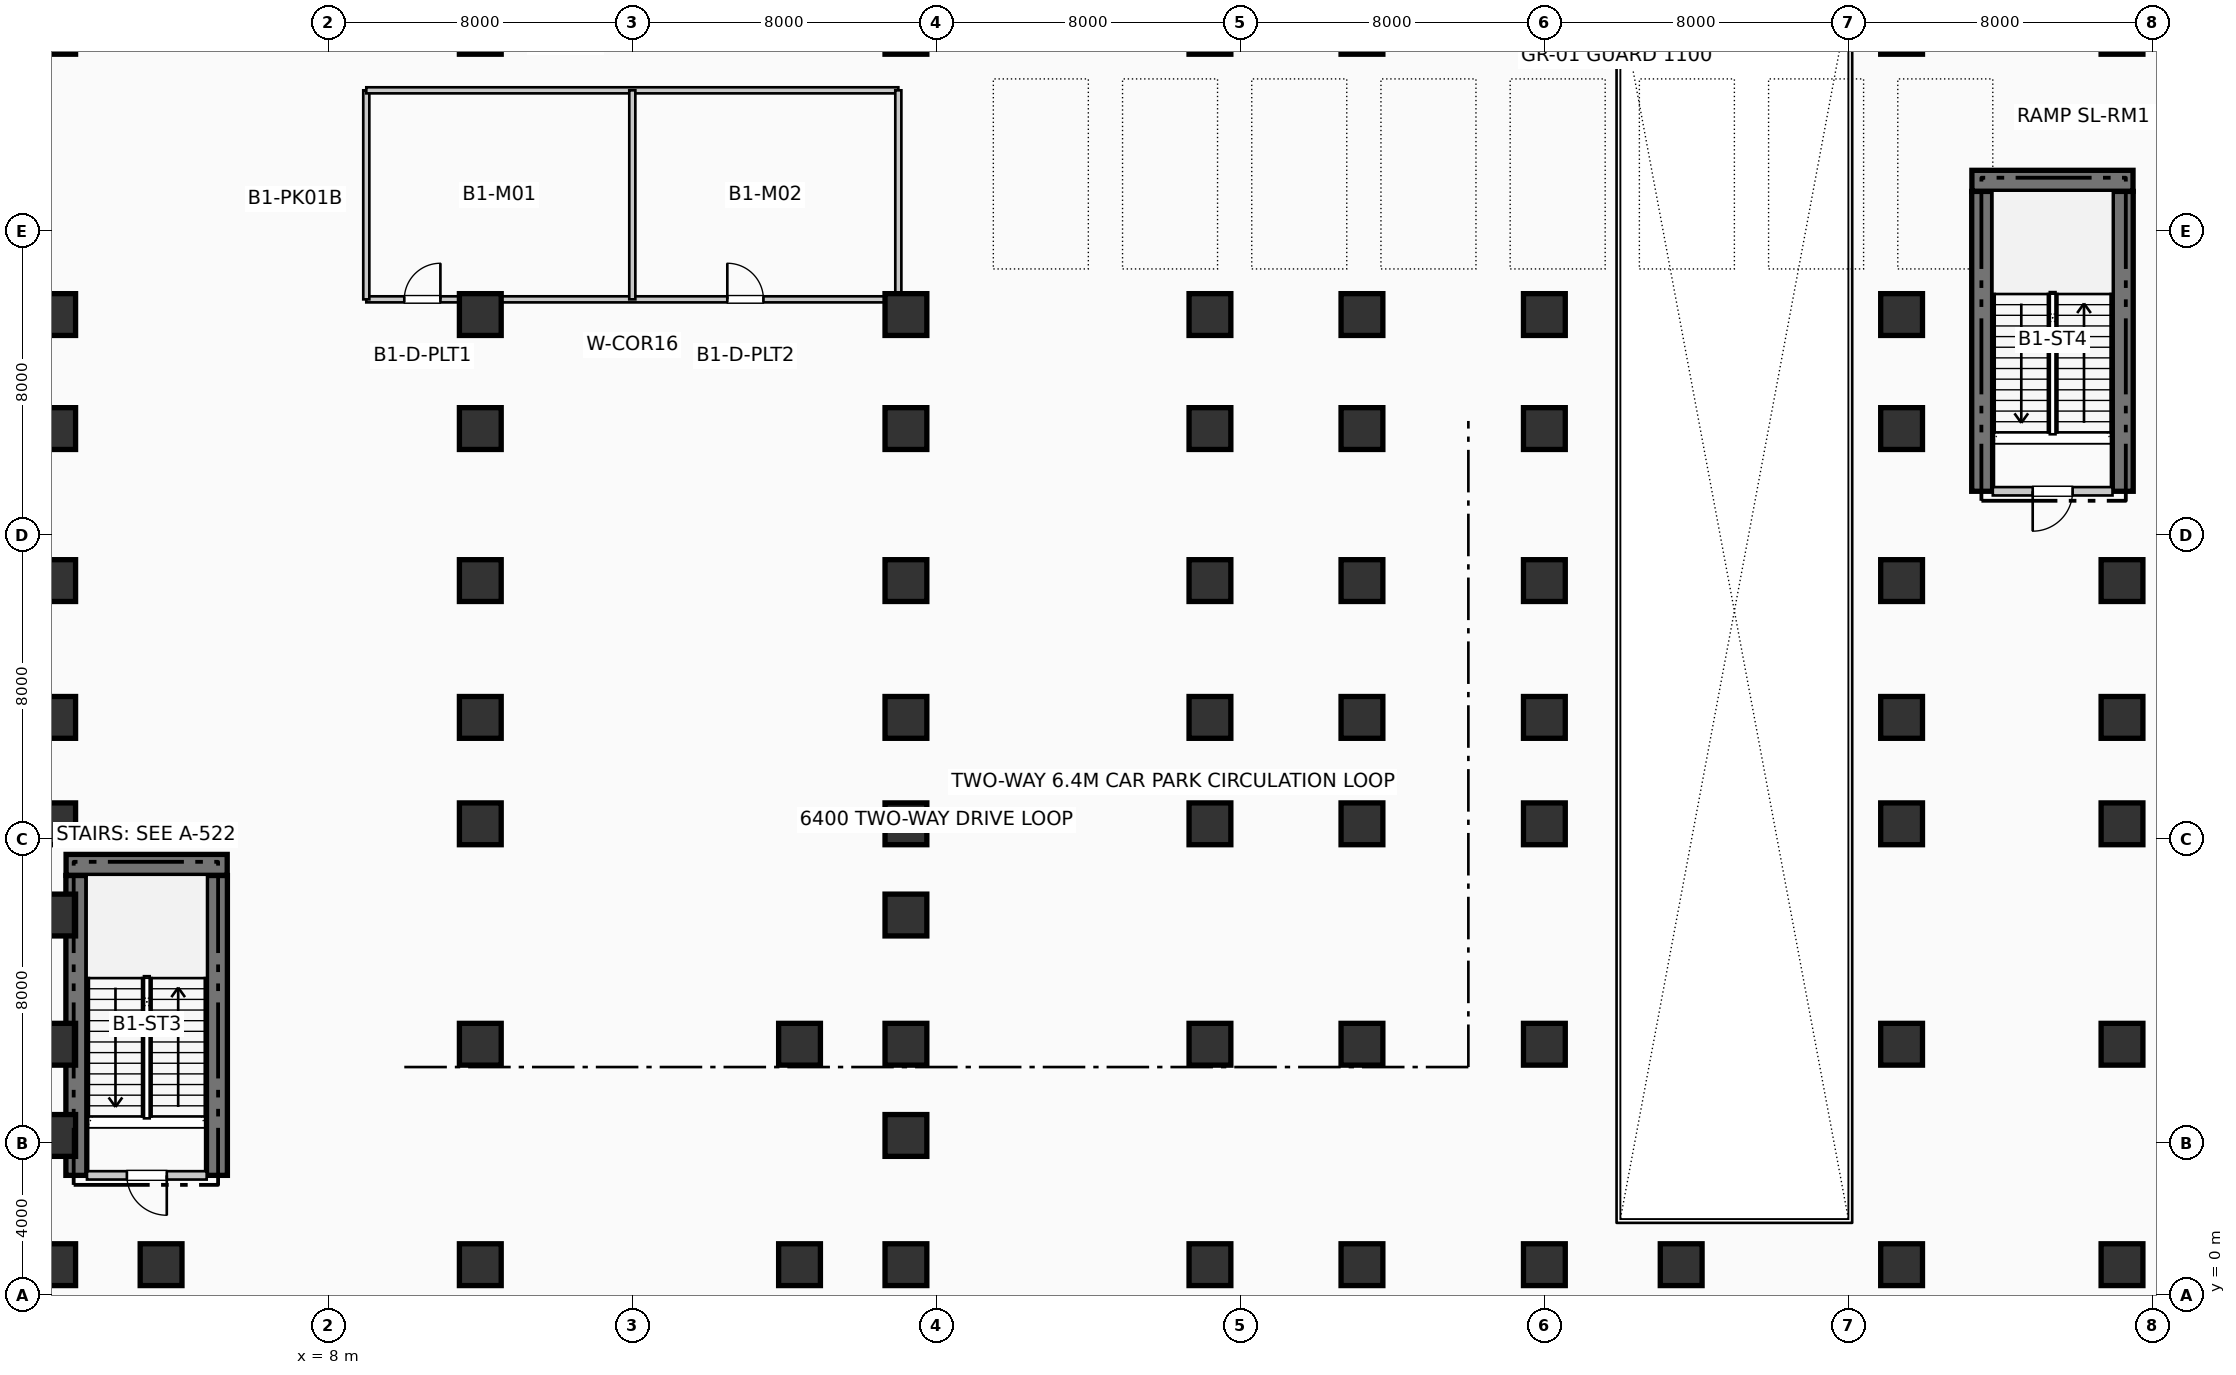
"""IFC4 building model, lengths in metres.
Left out: names, types, materials, properties, quantities, classifications, styles, units other than length and angle.
Written with IfcOpenShell. Run it as: python <this file> out.ifc"""

import sys

from ifc_helpers import new_model, si_unit, direction, frame, frame_2d, origin, origin_2d, place, context, subcontext, project, spatial, rectangle, extrude, element, fill, save


model = new_model("IFC4")
c1 = context("Model", 3, precision=1e-05, world=origin(), true_north=direction((0.0, 1.0)))
c2 = subcontext(c1, "Body", "Model", "MODEL_VIEW")
j1 = project(units=[si_unit("LENGTHUNIT", "METRE"), si_unit("PLANEANGLEUNIT", "RADIAN")], contexts=[c1])
p1 = place(None, origin())
s1 = spatial("IfcSite", under=j1, at=p1, CompositionType="ELEMENT")
p2 = place(p1, origin())
s2 = spatial("IfcBuilding", under=s1, at=p2, CompositionType="ELEMENT")
p3 = place(p2, frame((0.0, 0.0, -4.62)))
s3 = spatial("IfcBuildingStorey", under=s2, at=p3, CompositionType="ELEMENT", Elevation=-4.62)
for number, where, z_axis, x_axis in (
    (1, (1.37, 3.15, 0.0), (0.0, 0.0, 1.0), (0.0, 1.0, 0.0)),
    (2, (5.07, 3.15, 0.0), (0.0, 0.0, 1.0), (0.0, 1.0, 0.0)),
):
    element("IfcWall", number, at=place(p3, frame(where, z_axis=z_axis, x_axis=x_axis)), inside=s3, PredefinedType="SHEAR", context=c2, shape_type="SweptSolid", body=[
        extrude(rectangle(XDim=7.89, YDim=0.55, at=frame_2d((3.945, 0.0))), origin(), (0.0, 0.0, 1.0), 4.62),
    ])
p4 = place(p3, frame((1.1, 11.32, 0.0), z_axis=(0.0, 0.0, 1.0), x_axis=(1.0, 0.0, 0.0)))
e3 = element("IfcWall", 3, at=p4, inside=s3, PredefinedType="SHEAR", context=c2, shape_type="SweptSolid", body=[
    extrude(rectangle(XDim=4.24, YDim=0.55, at=frame_2d((2.12, 0.0))), origin(), (0.0, 0.0, 1.0), 4.62),
])
for number, where, z_axis, x_axis in (
    (4, (51.52, 21.15, 0.0), (0.0, 0.0, 1.0), (0.0, 1.0, 0.0)),
    (5, (55.22, 21.15, 0.0), (0.0, 0.0, 1.0), (0.0, 1.0, 0.0)),
):
    element("IfcWall", number, at=place(p3, frame(where, z_axis=z_axis, x_axis=x_axis)), inside=s3, PredefinedType="SHEAR", context=c2, shape_type="SweptSolid", body=[
        extrude(rectangle(XDim=7.89, YDim=0.55, at=frame_2d((3.945, 0.0))), origin(), (0.0, 0.0, 1.0), 4.62),
    ])
p5 = place(p3, frame((51.25, 29.32, 0.0), z_axis=(0.0, 0.0, 1.0), x_axis=(1.0, 0.0, 0.0)))
e6 = element("IfcWall", 6, at=p5, inside=s3, PredefinedType="SHEAR", context=c2, shape_type="SweptSolid", body=[
    extrude(rectangle(XDim=4.24, YDim=0.55, at=frame_2d((2.12, 0.0))), origin(), (0.0, 0.0, 1.0), 4.62),
])
for number, where, z_axis, x_axis in (
    (7, (0.8, 0.8, 0.0), (0.0, 0.0, 1.0), (1.0, 0.0, 0.0)),
    (8, (0.8, 4.2, 0.0), (0.0, 0.0, 1.0), (1.0, 0.0, 0.0)),
    (9, (0.8, 6.6, 0.0), (0.0, 0.0, 1.0), (1.0, 0.0, 0.0)),
    (10, (0.8, 10.0, 0.0), (0.0, 0.0, 1.0), (1.0, 0.0, 0.0)),
    (11, (0.8, 12.4, 0.0), (0.0, 0.0, 1.0), (1.0, 0.0, 0.0)),
    (12, (0.8, 15.2, 0.0), (0.0, 0.0, 1.0), (1.0, 0.0, 0.0)),
    (13, (0.8, 18.8, 0.0), (0.0, 0.0, 1.0), (1.0, 0.0, 0.0)),
    (14, (0.8, 22.8, 0.0), (0.0, 0.0, 1.0), (1.0, 0.0, 0.0)),
    (15, (0.8, 25.8, 0.0), (0.0, 0.0, 1.0), (1.0, 0.0, 0.0)),
    (16, (0.8, 33.2, 0.0), (0.0, 0.0, 1.0), (1.0, 0.0, 0.0)),
    (17, (3.6, 0.8, 0.0), (0.0, 0.0, 1.0), (1.0, 0.0, 0.0)),
    (18, (12.0, 0.8, 0.0), (0.0, 0.0, 1.0), (1.0, 0.0, 0.0)),
    (19, (12.0, 6.6, 0.0), (0.0, 0.0, 1.0), (1.0, 0.0, 0.0)),
    (20, (12.0, 12.4, 0.0), (0.0, 0.0, 1.0), (1.0, 0.0, 0.0)),
    (21, (12.0, 15.2, 0.0), (0.0, 0.0, 1.0), (1.0, 0.0, 0.0)),
    (22, (12.0, 18.8, 0.0), (0.0, 0.0, 1.0), (1.0, 0.0, 0.0)),
    (23, (12.0, 22.8, 0.0), (0.0, 0.0, 1.0), (1.0, 0.0, 0.0)),
    (24, (12.0, 25.8, 0.0), (0.0, 0.0, 1.0), (1.0, 0.0, 0.0)),
    (25, (12.0, 33.2, 0.0), (0.0, 0.0, 1.0), (1.0, 0.0, 0.0)),
    (26, (20.4, 0.8, 0.0), (0.0, 0.0, 1.0), (1.0, 0.0, 0.0)),
    (27, (20.4, 6.6, 0.0), (0.0, 0.0, 1.0), (1.0, 0.0, 0.0)),
    (28, (23.2, 0.8, 0.0), (0.0, 0.0, 1.0), (1.0, 0.0, 0.0)),
    (29, (23.2, 4.2, 0.0), (0.0, 0.0, 1.0), (1.0, 0.0, 0.0)),
    (30, (23.2, 6.6, 0.0), (0.0, 0.0, 1.0), (1.0, 0.0, 0.0)),
    (31, (23.2, 10.0, 0.0), (0.0, 0.0, 1.0), (1.0, 0.0, 0.0)),
    (32, (23.2, 12.4, 0.0), (0.0, 0.0, 1.0), (1.0, 0.0, 0.0)),
    (33, (23.2, 15.2, 0.0), (0.0, 0.0, 1.0), (1.0, 0.0, 0.0)),
    (34, (23.2, 18.8, 0.0), (0.0, 0.0, 1.0), (1.0, 0.0, 0.0)),
    (35, (23.2, 22.8, 0.0), (0.0, 0.0, 1.0), (1.0, 0.0, 0.0)),
    (36, (23.2, 25.8, 0.0), (0.0, 0.0, 1.0), (1.0, 0.0, 0.0)),
    (37, (23.2, 33.2, 0.0), (0.0, 0.0, 1.0), (1.0, 0.0, 0.0)),
    (38, (31.2, 0.8, 0.0), (0.0, 0.0, 1.0), (1.0, 0.0, 0.0)),
    (39, (31.2, 6.6, 0.0), (0.0, 0.0, 1.0), (1.0, 0.0, 0.0)),
    (40, (31.2, 12.4, 0.0), (0.0, 0.0, 1.0), (1.0, 0.0, 0.0)),
    (41, (31.2, 15.2, 0.0), (0.0, 0.0, 1.0), (1.0, 0.0, 0.0)),
    (42, (31.2, 18.8, 0.0), (0.0, 0.0, 1.0), (1.0, 0.0, 0.0)),
    (43, (31.2, 22.8, 0.0), (0.0, 0.0, 1.0), (1.0, 0.0, 0.0)),
    (44, (31.2, 25.8, 0.0), (0.0, 0.0, 1.0), (1.0, 0.0, 0.0)),
    (45, (31.2, 33.2, 0.0), (0.0, 0.0, 1.0), (1.0, 0.0, 0.0)),
    (46, (35.2, 0.8, 0.0), (0.0, 0.0, 1.0), (1.0, 0.0, 0.0)),
    (47, (35.2, 6.6, 0.0), (0.0, 0.0, 1.0), (1.0, 0.0, 0.0)),
    (48, (35.2, 12.4, 0.0), (0.0, 0.0, 1.0), (1.0, 0.0, 0.0)),
    (49, (35.2, 15.2, 0.0), (0.0, 0.0, 1.0), (1.0, 0.0, 0.0)),
    (50, (35.2, 18.8, 0.0), (0.0, 0.0, 1.0), (1.0, 0.0, 0.0)),
    (51, (35.2, 22.8, 0.0), (0.0, 0.0, 1.0), (1.0, 0.0, 0.0)),
    (52, (35.2, 25.8, 0.0), (0.0, 0.0, 1.0), (1.0, 0.0, 0.0)),
    (53, (35.2, 33.2, 0.0), (0.0, 0.0, 1.0), (1.0, 0.0, 0.0)),
    (54, (40.0, 0.8, 0.0), (0.0, 0.0, 1.0), (1.0, 0.0, 0.0)),
    (55, (40.0, 6.6, 0.0), (0.0, 0.0, 1.0), (1.0, 0.0, 0.0)),
    (56, (40.0, 12.4, 0.0), (0.0, 0.0, 1.0), (1.0, 0.0, 0.0)),
    (57, (40.0, 15.2, 0.0), (0.0, 0.0, 1.0), (1.0, 0.0, 0.0)),
    (58, (40.0, 18.8, 0.0), (0.0, 0.0, 1.0), (1.0, 0.0, 0.0)),
    (59, (40.0, 22.8, 0.0), (0.0, 0.0, 1.0), (1.0, 0.0, 0.0)),
    (60, (40.0, 25.8, 0.0), (0.0, 0.0, 1.0), (1.0, 0.0, 0.0)),
    (61, (40.0, 33.2, 0.0), (0.0, 0.0, 1.0), (1.0, 0.0, 0.0)),
    (62, (43.6, 0.8, 0.0), (0.0, 0.0, 1.0), (1.0, 0.0, 0.0)),
    (63, (49.4, 0.8, 0.0), (0.0, 0.0, 1.0), (1.0, 0.0, 0.0)),
    (64, (49.4, 6.6, 0.0), (0.0, 0.0, 1.0), (1.0, 0.0, 0.0)),
    (65, (49.4, 12.4, 0.0), (0.0, 0.0, 1.0), (1.0, 0.0, 0.0)),
    (66, (49.4, 15.2, 0.0), (0.0, 0.0, 1.0), (1.0, 0.0, 0.0)),
    (67, (49.4, 18.8, 0.0), (0.0, 0.0, 1.0), (1.0, 0.0, 0.0)),
    (68, (49.4, 22.8, 0.0), (0.0, 0.0, 1.0), (1.0, 0.0, 0.0)),
    (69, (49.4, 25.8, 0.0), (0.0, 0.0, 1.0), (1.0, 0.0, 0.0)),
    (70, (49.4, 33.2, 0.0), (0.0, 0.0, 1.0), (1.0, 0.0, 0.0)),
    (71, (55.2, 0.8, 0.0), (0.0, 0.0, 1.0), (1.0, 0.0, 0.0)),
    (72, (55.2, 6.6, 0.0), (0.0, 0.0, 1.0), (1.0, 0.0, 0.0)),
    (73, (55.2, 12.4, 0.0), (0.0, 0.0, 1.0), (1.0, 0.0, 0.0)),
    (74, (55.2, 15.2, 0.0), (0.0, 0.0, 1.0), (1.0, 0.0, 0.0)),
    (75, (55.2, 18.8, 0.0), (0.0, 0.0, 1.0), (1.0, 0.0, 0.0)),
    (76, (55.2, 33.2, 0.0), (0.0, 0.0, 1.0), (1.0, 0.0, 0.0)),
):
    element("IfcColumn", number, at=place(p3, frame(where, z_axis=z_axis, x_axis=x_axis)), inside=s3, PredefinedType="COLUMN", context=c2, shape_type="SweptSolid", body=[
        extrude(rectangle(XDim=1.1, YDim=1.1, at=origin_2d()), origin(), (0.0, 0.0, 1.0), 4.62),
    ])
p6 = place(p3, frame((1.65, 3.15, 0.0), z_axis=(0.0, 0.0, 1.0), x_axis=(1.0, 0.0, 0.0)))
e77 = element("IfcWall", 77, at=p6, inside=s3, PredefinedType="PARTITIONING", context=c2, shape_type="SweptSolid", body=[
    extrude(rectangle(XDim=3.15, YDim=0.22, at=frame_2d((1.575, 0.0))), origin(), (0.0, 0.0, 1.0), 4.3),
])
p7 = place(p6, frame((2.1, 0.0, 0.0), z_axis=(0.0, 0.0, 1.0), x_axis=(-1.0, 0.0, 0.0)))
e78 = element("IfcOpeningElement", 78, at=p7, cuts=e77, PredefinedType="OPENING", context=c2, shape_type="SweptSolid", body=[
    extrude(rectangle(XDim=1.05, YDim=2.15, at=frame_2d((0.525, 1.075))), frame((0.0, 0.12, 0.0), z_axis=(0.0, -1.0, 0.0), x_axis=(1.0, 0.0, 0.0)), (0.0, 0.0, 1.0), 0.24),
])
p8 = place(p3, frame((51.8, 21.15, 0.0), z_axis=(0.0, 0.0, 1.0), x_axis=(1.0, 0.0, 0.0)))
e79 = element("IfcWall", 79, at=p8, inside=s3, PredefinedType="PARTITIONING", context=c2, shape_type="SweptSolid", body=[
    extrude(rectangle(XDim=3.15, YDim=0.22, at=frame_2d((1.575, 0.0))), origin(), (0.0, 0.0, 1.0), 4.3),
])
p9 = place(p8, frame((2.1, 0.0, 0.0), z_axis=(0.0, 0.0, 1.0), x_axis=(-1.0, 0.0, 0.0)))
e80 = element("IfcOpeningElement", 80, at=p9, cuts=e79, PredefinedType="OPENING", context=c2, shape_type="SweptSolid", body=[
    extrude(rectangle(XDim=1.05, YDim=2.15, at=frame_2d((0.525, 1.075))), frame((0.0, 0.12, 0.0), z_axis=(0.0, -1.0, 0.0), x_axis=(1.0, 0.0, 0.0)), (0.0, 0.0, 1.0), 0.24),
])
p10 = place(p3, frame((9.0, 26.2, 0.0), z_axis=(0.0, 0.0, 1.0), x_axis=(1.0, 0.0, 0.0)))
e81 = element("IfcWall", 81, at=p10, inside=s3, PredefinedType="PARTITIONING", context=c2, shape_type="SweptSolid", body=[
    extrude(rectangle(XDim=14.0, YDim=0.16, at=frame_2d((7.0, 0.0))), origin(), (0.0, 0.0, 1.0), 3.485),
])
p11 = place(p10, frame((1.0, 0.0, 0.0)))
e82 = element("IfcOpeningElement", 82, at=p11, cuts=e81, PredefinedType="OPENING", context=c2, shape_type="SweptSolid", body=[
    extrude(rectangle(XDim=0.95, YDim=2.1, at=frame_2d((0.475, 1.05))), frame((0.0, 0.09, 0.0), z_axis=(0.0, -1.0, 0.0), x_axis=(1.0, 0.0, 0.0)), (0.0, 0.0, 1.0), 0.18),
])
p12 = place(p10, frame((9.5, 0.0, 0.0)))
e83 = element("IfcOpeningElement", 83, at=p12, cuts=e81, PredefinedType="OPENING", context=c2, shape_type="SweptSolid", body=[
    extrude(rectangle(XDim=0.95, YDim=2.1, at=frame_2d((0.475, 1.05))), frame((0.0, 0.09, 0.0), z_axis=(0.0, -1.0, 0.0), x_axis=(1.0, 0.0, 0.0)), (0.0, 0.0, 1.0), 0.18),
])
p13 = place(p3, frame((9.0, 26.2, 0.0), z_axis=(0.0, 0.0, 1.0), x_axis=(0.0, 1.0, 0.0)))
e84 = element("IfcWall", 84, at=p13, inside=s3, PredefinedType="PARTITIONING", context=c2, shape_type="SweptSolid", body=[
    extrude(rectangle(XDim=5.5, YDim=0.16, at=frame_2d((2.75, 0.0))), origin(), (0.0, 0.0, 1.0), 4.3),
])
p14 = place(p3, frame((9.0, 31.7, 0.0), z_axis=(0.0, 0.0, 1.0), x_axis=(1.0, 0.0, 0.0)))
e85 = element("IfcWall", 85, at=p14, inside=s3, PredefinedType="PARTITIONING", context=c2, shape_type="SweptSolid", body=[
    extrude(rectangle(XDim=14.0, YDim=0.16, at=frame_2d((7.0, 0.0))), origin(), (0.0, 0.0, 1.0), 4.3),
])
p15 = place(p3, frame((23.0, 26.2, 0.0), z_axis=(0.0, 0.0, 1.0), x_axis=(0.0, 1.0, 0.0)))
e86 = element("IfcWall", 86, at=p15, inside=s3, PredefinedType="PARTITIONING", context=c2, shape_type="SweptSolid", body=[
    extrude(rectangle(XDim=5.5, YDim=0.16, at=frame_2d((2.75, 0.0))), origin(), (0.0, 0.0, 1.0), 3.485),
])
p16 = place(p3, frame((16.0, 26.2, 0.0), z_axis=(0.0, 0.0, 1.0), x_axis=(0.0, 1.0, 0.0)))
e87 = element("IfcWall", 87, at=p16, inside=s3, PredefinedType="PARTITIONING", context=c2, shape_type="SweptSolid", body=[
    extrude(rectangle(XDim=5.5, YDim=0.16, at=frame_2d((2.75, 0.0))), origin(), (0.0, 0.0, 1.0), 4.3),
])
p17 = place(p7, origin())
e88 = element("IfcDoor", 88, at=p17, inside=s3, OperationType="SINGLE_SWING_RIGHT", PredefinedType="DOOR", context=c2, shape_type="SweptSolid", body=[
    extrude(rectangle(XDim=1.05, YDim=2.15, at=frame_2d((0.525, 1.075))), frame((0.0, 0.025, 0.0), z_axis=(0.0, -1.0, 0.0), x_axis=(1.0, 0.0, 0.0)), (0.0, 0.0, 1.0), 0.05),
])
fill(e78, e88)
p18 = place(p9, origin())
e89 = element("IfcDoor", 89, at=p18, inside=s3, OperationType="SINGLE_SWING_LEFT", PredefinedType="DOOR", context=c2, shape_type="SweptSolid", body=[
    extrude(rectangle(XDim=1.05, YDim=2.15, at=frame_2d((0.525, 1.075))), frame((0.0, 0.025, 0.0), z_axis=(0.0, -1.0, 0.0), x_axis=(1.0, 0.0, 0.0)), (0.0, 0.0, 1.0), 0.05),
])
fill(e80, e89)
p19 = place(p11, origin())
e90 = element("IfcDoor", 90, at=p19, inside=s3, OperationType="SINGLE_SWING_RIGHT", PredefinedType="DOOR", context=c2, shape_type="SweptSolid", body=[
    extrude(rectangle(XDim=0.95, YDim=2.1, at=frame_2d((0.475, 1.05))), frame((0.0, 0.025, 0.0), z_axis=(0.0, -1.0, 0.0), x_axis=(1.0, 0.0, 0.0)), (0.0, 0.0, 1.0), 0.05),
])
fill(e82, e90)
p20 = place(p12, origin())
e91 = element("IfcDoor", 91, at=p20, inside=s3, OperationType="SINGLE_SWING_LEFT", PredefinedType="DOOR", context=c2, shape_type="SweptSolid", body=[
    extrude(rectangle(XDim=0.95, YDim=2.1, at=frame_2d((0.475, 1.05))), frame((0.0, 0.025, 0.0), z_axis=(0.0, -1.0, 0.0), x_axis=(1.0, 0.0, 0.0)), (0.0, 0.0, 1.0), 0.05),
])
fill(e83, e91)
save(model, sys.argv[1])
